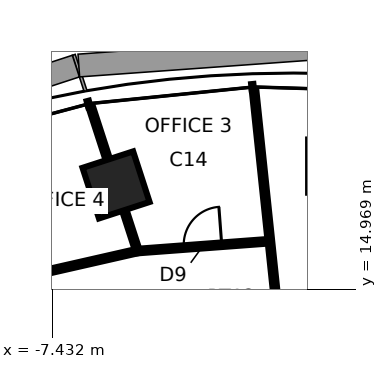
"""IFC4 building model, lengths in metres.
Left out: names, types, materials, properties, quantities, classifications, styles, units other than length and angle.
Written with IfcOpenShell. Run it as: python <this file> out.ifc"""

import sys

from ifc_helpers import new_model, si_unit, direction, frame, frame_2d, origin, origin_2d, place, context, subcontext, project, spatial, rectangle, extrude, element, fill, save


model = new_model("IFC4")
c1 = context("Model", 3, precision=1e-05, world=origin(), true_north=direction((0.0, 1.0)))
c2 = subcontext(c1, "Body", "Model", "MODEL_VIEW")
j1 = project(units=[si_unit("LENGTHUNIT", "METRE"), si_unit("PLANEANGLEUNIT", "RADIAN")], contexts=[c1])
p1 = place(None, origin())
s1 = spatial("IfcSite", under=j1, at=p1, CompositionType="ELEMENT")
p2 = place(p1, origin())
s2 = spatial("IfcBuilding", under=s1, at=p2, CompositionType="ELEMENT")
p3 = place(p2, frame((0.0, 0.0, 187.7)))
s3 = spatial("IfcBuildingStorey", under=s2, at=p3, CompositionType="ELEMENT", Elevation=187.7)
p4 = place(p3, frame((-5.754, 17.708, 0.0), z_axis=(0.0, 0.0, 1.0), x_axis=(-0.309016994375, 0.951056516295, 0.0)))
e1 = element("IfcColumn", 1, at=p4, inside=s3, PredefinedType="COLUMN", context=c2, shape_type="SweptSolid", body=[
    extrude(rectangle(XDim=1.4, YDim=1.4, at=origin_2d()), origin(), (0.0, 0.0, 1.0), 3.9),
])
p5 = place(p3, frame((-0.999, 9.5, 0.0), z_axis=(0.0, 0.0, 1.0), x_axis=(-0.10451834001, 0.994522959313, 0.0)))
e2 = element("IfcWall", 2, at=p5, inside=s3, PredefinedType="PARTITIONING", context=c2, shape_type="SweptSolid", body=[
    extrude(rectangle(XDim=10.766, YDim=0.12, at=frame_2d((5.383, 0.0))), origin(), (0.0, 0.0, 1.0), 3.74),
])
p6 = place(p3, frame((-5.188, 15.969, 0.0), z_axis=(0.0, 0.0, 1.0), x_axis=(0.997219476507, 0.074520572167, 0.0)))
e3 = element("IfcWall", 3, at=p6, inside=s3, PredefinedType="PARTITIONING", context=c2, shape_type="SweptSolid", body=[
    extrude(rectangle(XDim=3.492, YDim=0.12, at=frame_2d((1.746, 0.0))), origin(), (0.0, 0.0, 1.0), 3.74),
])
p7 = place(p6, frame((1.221, 0.0, 0.0)))
e4 = element("IfcOpeningElement", 4, at=p7, cuts=e3, PredefinedType="OPENING", context=c2, shape_type="SweptSolid", body=[
    extrude(rectangle(XDim=1.0, YDim=2.4, at=frame_2d((0.5, 1.2))), frame((0.0, 0.07, 0.0), z_axis=(0.0, -1.0, 0.0), x_axis=(1.0, 0.0, 0.0)), (0.0, 0.0, 1.0), 0.14),
])
p8 = place(p3, frame((-5.188, 15.969, 0.0), z_axis=(0.0, 0.0, 1.0), x_axis=(-0.309022586479, 0.951054699292, 0.0)))
e5 = element("IfcWall", 5, at=p8, inside=s3, PredefinedType="PARTITIONING", context=c2, shape_type="SweptSolid", body=[
    extrude(rectangle(XDim=4.0, YDim=0.12, at=frame_2d((2.0, 0.0))), origin(), (0.0, 0.0, 1.0), 3.04),
])
p9 = place(p3, frame((-8.751, 15.158, 0.0), z_axis=(0.0, 0.0, 1.0), x_axis=(0.975057981002, 0.221950295525, 0.0)))
e6 = element("IfcWall", 6, at=p9, inside=s3, PredefinedType="PARTITIONING", context=c2, shape_type="SweptSolid", body=[
    extrude(rectangle(XDim=3.654, YDim=0.12, at=frame_2d((1.827, 0.0))), origin(), (0.0, 0.0, 1.0), 3.74),
])
p10 = place(p7, origin())
e7 = element("IfcDoor", 7, at=p10, inside=s3, OperationType="SINGLE_SWING_RIGHT", PredefinedType="DOOR", context=c2, shape_type="SweptSolid", body=[
    extrude(rectangle(XDim=1.0, YDim=2.4, at=frame_2d((0.5, 1.2))), frame((0.0, 0.025, 0.0), z_axis=(0.0, -1.0, 0.0), x_axis=(1.0, 0.0, 0.0)), (0.0, 0.0, 1.0), 0.05),
])
fill(e4, e7)
save(model, sys.argv[1])
